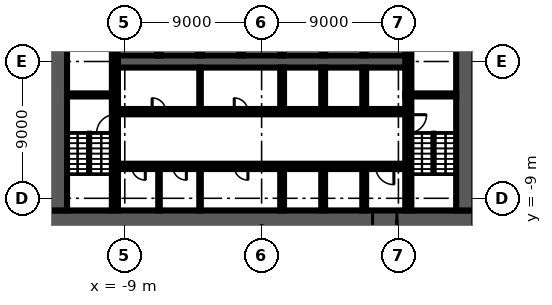
"""IFC4 building model, lengths in metres.
Left out: names, types, materials, properties, quantities, classifications, styles, units other than length and angle.
Written with IfcOpenShell. Run it as: python <this file> out.ifc"""

import sys

from ifc_helpers import new_model, si_unit, direction, frame, frame_2d, origin, place, context, subcontext, project, spatial, rectangle, extrude, element, fill, save


model = new_model("IFC4")
c1 = context("Model", 3, precision=1e-05, world=origin(), true_north=direction((0.0, 1.0)))
c2 = subcontext(c1, "Body", "Model", "MODEL_VIEW")
j1 = project(units=[si_unit("LENGTHUNIT", "METRE"), si_unit("PLANEANGLEUNIT", "RADIAN")], contexts=[c1])
p1 = place(None, origin())
s1 = spatial("IfcSite", under=j1, at=p1, CompositionType="ELEMENT")
p2 = place(p1, origin())
s2 = spatial("IfcBuilding", under=s1, at=p2, CompositionType="ELEMENT")
p3 = place(p2, frame((0.0, 0.0, -6.0)))
s3 = spatial("IfcBuildingStorey", under=s2, at=p3, CompositionType="ELEMENT", Elevation=-6.0)
p4 = place(p3, frame((14.0, -10.4, 0.0), z_axis=(0.0, 0.0, 1.0), x_axis=(-1.0, 0.0, 0.0)))
e1 = element("IfcWall", 1, at=p4, inside=s3, PredefinedType="SHEAR", context=c2, shape_type="SweptSolid", body=[
    extrude(rectangle(XDim=28.0, YDim=1.2, at=frame_2d((14.0, 0.0))), origin(), (0.0, 0.0, 1.0), 5.55),
])
p5 = place(p4, frame((5.1, 0.0, 0.0)))
e2 = element("IfcOpeningElement", 2, at=p5, cuts=e1, PredefinedType="OPENING", context=c2, shape_type="SweptSolid", body=[
    extrude(rectangle(XDim=1.6, YDim=2.1, at=frame_2d((0.8, 1.05))), frame((0.0, 0.61, 0.0), z_axis=(0.0, -1.0, 0.0), x_axis=(1.0, 0.0, 0.0)), (0.0, 0.0, 1.0), 1.22),
])
for number, where, z_axis, x_axis in (
    (3, (13.4, 9.8, 0.0), (0.0, 0.0, 1.0), (0.0, -1.0, 0.0)),
    (4, (-13.4, -9.8, 0.0), (0.0, 0.0, 1.0), (0.0, 1.0, 0.0)),
):
    element("IfcWall", number, at=place(p3, frame(where, z_axis=z_axis, x_axis=x_axis)), inside=s3, PredefinedType="SHEAR", context=c2, shape_type="SweptSolid", body=[
        extrude(rectangle(XDim=19.6, YDim=1.2, at=frame_2d((9.8, 0.0))), origin(), (0.0, 0.0, 1.0), 5.55),
    ])
p6 = place(p3, frame((9.65, -2.3, 0.0), z_axis=(0.0, 0.0, 1.0), x_axis=(0.0, -1.0, 0.0)))
e5 = element("IfcWall", 5, at=p6, inside=s3, PredefinedType="SHEAR", context=c2, shape_type="SweptSolid", body=[
    extrude(rectangle(XDim=7.5, YDim=0.4, at=frame_2d((3.75, 0.0))), origin(), (0.0, 0.0, 1.0), 5.55),
])
p7 = place(p6, frame((1.2, 0.0, 0.0)))
e6 = element("IfcOpeningElement", 6, at=p7, cuts=e5, PredefinedType="OPENING", context=c2, shape_type="SweptSolid", body=[
    extrude(rectangle(XDim=1.2, YDim=2.1, at=frame_2d((0.6, 1.05))), frame((0.0, 0.21, 0.0), z_axis=(0.0, -1.0, 0.0), x_axis=(1.0, 0.0, 0.0)), (0.0, 0.0, 1.0), 0.42),
])
p8 = place(p3, frame((9.65, 2.1, 0.0), z_axis=(0.0, 0.0, 1.0), x_axis=(0.0, -1.0, 0.0)))
e7 = element("IfcWall", 7, at=p8, inside=s3, PredefinedType="SHEAR", context=c2, shape_type="SweptSolid", body=[
    extrude(rectangle(XDim=4.2, YDim=0.4, at=frame_2d((2.1, 0.0))), origin(), (0.0, 0.0, 1.0), 5.55),
])
p9 = place(p8, frame((0.15, 0.0, 0.0)))
e8 = element("IfcOpeningElement", 8, at=p9, cuts=e7, PredefinedType="OPENING", context=c2, shape_type="SweptSolid", body=[
    extrude(rectangle(XDim=0.9, YDim=2.1, at=frame_2d((0.45, 1.05))), frame((0.0, 0.21, 0.0), z_axis=(0.0, -1.0, 0.0), x_axis=(1.0, 0.0, 0.0)), (0.0, 0.0, 1.0), 0.42),
])
p10 = place(p3, frame((-9.65, -9.8, 0.0), z_axis=(0.0, 0.0, 1.0), x_axis=(0.0, 1.0, 0.0)))
e9 = element("IfcWall", 9, at=p10, inside=s3, PredefinedType="SHEAR", context=c2, shape_type="SweptSolid", body=[
    extrude(rectangle(XDim=7.5, YDim=0.4, at=frame_2d((3.75, 0.0))), origin(), (0.0, 0.0, 1.0), 5.55),
])
p11 = place(p10, frame((5.1, 0.0, 0.0)))
e10 = element("IfcOpeningElement", 10, at=p11, cuts=e9, PredefinedType="OPENING", context=c2, shape_type="SweptSolid", body=[
    extrude(rectangle(XDim=1.2, YDim=2.1, at=frame_2d((0.6, 1.05))), frame((0.0, 0.21, 0.0), z_axis=(0.0, -1.0, 0.0), x_axis=(1.0, 0.0, 0.0)), (0.0, 0.0, 1.0), 0.42),
])
p12 = place(p3, frame((-9.65, -2.1, 0.0), z_axis=(0.0, 0.0, 1.0), x_axis=(0.0, 1.0, 0.0)))
e11 = element("IfcWall", 11, at=p12, inside=s3, PredefinedType="SHEAR", context=c2, shape_type="SweptSolid", body=[
    extrude(rectangle(XDim=4.2, YDim=0.4, at=frame_2d((2.1, 0.0))), origin(), (0.0, 0.0, 1.0), 5.55),
])
for number, where, z_axis, x_axis in (
    (12, (9.45, -2.2, 0.0), (0.0, 0.0, 1.0), (1.0, 0.0, 0.0)),
    (13, (-9.45, -2.2, 0.0), (0.0, 0.0, 1.0), (-1.0, 0.0, 0.0)),
):
    element("IfcWall", number, at=place(p3, frame(where, z_axis=z_axis, x_axis=x_axis)), inside=s3, PredefinedType="SHEAR", context=c2, shape_type="SweptSolid", body=[
        extrude(rectangle(XDim=3.35, YDim=0.2, at=frame_2d((1.675, 0.0))), origin(), (0.0, 0.0, 1.0), 5.55),
    ])
p13 = place(p3, frame((-9.45, -3.3, 0.0), z_axis=(0.0, 0.0, 1.0), x_axis=(1.0, 0.0, 0.0)))
e14 = element("IfcWall", 14, at=p13, inside=s3, PredefinedType="SHEAR", context=c2, shape_type="SweptSolid", body=[
    extrude(rectangle(XDim=18.9, YDim=0.35, at=frame_2d((9.45, 0.0))), origin(), (0.0, 0.0, 1.0), 5.55),
])
p14 = place(p13, frame((11.6, 0.0, 0.0)))
e15 = element("IfcOpeningElement", 15, at=p14, cuts=e14, PredefinedType="OPENING", context=c2, shape_type="SweptSolid", body=[
    extrude(rectangle(XDim=1.1, YDim=2.1, at=frame_2d((0.55, 1.05))), frame((0.0, 0.185, 0.0), z_axis=(0.0, -1.0, 0.0), x_axis=(1.0, 0.0, 0.0)), (0.0, 0.0, 1.0), 0.37),
])
p15 = place(p13, frame((14.3, 0.0, 0.0)))
e16 = element("IfcOpeningElement", 16, at=p15, cuts=e14, PredefinedType="OPENING", context=c2, shape_type="SweptSolid", body=[
    extrude(rectangle(XDim=1.1, YDim=2.1, at=frame_2d((0.55, 1.05))), frame((0.0, 0.185, 0.0), z_axis=(0.0, -1.0, 0.0), x_axis=(1.0, 0.0, 0.0)), (0.0, 0.0, 1.0), 0.37),
])
p16 = place(p13, frame((17.0, 0.0, 0.0)))
e17 = element("IfcOpeningElement", 17, at=p16, cuts=e14, PredefinedType="OPENING", context=c2, shape_type="SweptSolid", body=[
    extrude(rectangle(XDim=1.1, YDim=2.1, at=frame_2d((0.55, 1.05))), frame((0.0, 0.185, 0.0), z_axis=(0.0, -1.0, 0.0), x_axis=(1.0, 0.0, 0.0)), (0.0, 0.0, 1.0), 0.37),
])
p17 = place(p13, frame((2.25, 0.0, 0.0)))
e18 = element("IfcOpeningElement", 18, at=p17, cuts=e14, PredefinedType="OPENING", context=c2, shape_type="SweptSolid", body=[
    extrude(rectangle(XDim=0.9, YDim=2.1, at=frame_2d((0.45, 1.05))), frame((0.0, 0.185, 0.0), z_axis=(0.0, -1.0, 0.0), x_axis=(1.0, 0.0, 0.0)), (0.0, 0.0, 1.0), 0.37),
])
p18 = place(p13, frame((7.65, 0.0, 0.0)))
e19 = element("IfcOpeningElement", 19, at=p18, cuts=e14, PredefinedType="OPENING", context=c2, shape_type="SweptSolid", body=[
    extrude(rectangle(XDim=0.9, YDim=2.1, at=frame_2d((0.45, 1.05))), frame((0.0, 0.185, 0.0), z_axis=(0.0, -1.0, 0.0), x_axis=(1.0, 0.0, 0.0)), (0.0, 0.0, 1.0), 0.37),
])
p19 = place(p3, frame((9.45, -6.9, 0.0), z_axis=(0.0, 0.0, 1.0), x_axis=(-1.0, 0.0, 0.0)))
e20 = element("IfcWall", 20, at=p19, inside=s3, PredefinedType="SHEAR", context=c2, shape_type="SweptSolid", body=[
    extrude(rectangle(XDim=18.9, YDim=0.35, at=frame_2d((9.45, 0.0))), origin(), (0.0, 0.0, 1.0), 5.55),
])
p20 = place(p19, frame((6.2, 0.0, 0.0)))
e21 = element("IfcOpeningElement", 21, at=p20, cuts=e20, PredefinedType="OPENING", context=c2, shape_type="SweptSolid", body=[
    extrude(rectangle(XDim=1.1, YDim=2.1, at=frame_2d((0.55, 1.05))), frame((0.0, 0.185, 0.0), z_axis=(0.0, -1.0, 0.0), x_axis=(1.0, 0.0, 0.0)), (0.0, 0.0, 1.0), 0.37),
])
p21 = place(p19, frame((3.5, 0.0, 0.0)))
e22 = element("IfcOpeningElement", 22, at=p21, cuts=e20, PredefinedType="OPENING", context=c2, shape_type="SweptSolid", body=[
    extrude(rectangle(XDim=1.1, YDim=2.1, at=frame_2d((0.55, 1.05))), frame((0.0, 0.185, 0.0), z_axis=(0.0, -1.0, 0.0), x_axis=(1.0, 0.0, 0.0)), (0.0, 0.0, 1.0), 0.37),
])
p22 = place(p19, frame((0.75, 0.0, 0.0)))
e23 = element("IfcOpeningElement", 23, at=p22, cuts=e20, PredefinedType="OPENING", context=c2, shape_type="SweptSolid", body=[
    extrude(rectangle(XDim=1.2, YDim=2.1, at=frame_2d((0.6, 1.05))), frame((0.0, 0.185, 0.0), z_axis=(0.0, -1.0, 0.0), x_axis=(1.0, 0.0, 0.0)), (0.0, 0.0, 1.0), 0.37),
])
p23 = place(p19, frame((17.1, 0.0, 0.0)))
e24 = element("IfcOpeningElement", 24, at=p23, cuts=e20, PredefinedType="OPENING", context=c2, shape_type="SweptSolid", body=[
    extrude(rectangle(XDim=0.9, YDim=2.1, at=frame_2d((0.45, 1.05))), frame((0.0, 0.185, 0.0), z_axis=(0.0, -1.0, 0.0), x_axis=(1.0, 0.0, 0.0)), (0.0, 0.0, 1.0), 0.37),
])
p24 = place(p19, frame((14.4, 0.0, 0.0)))
e25 = element("IfcOpeningElement", 25, at=p24, cuts=e20, PredefinedType="OPENING", context=c2, shape_type="SweptSolid", body=[
    extrude(rectangle(XDim=0.9, YDim=2.1, at=frame_2d((0.45, 1.05))), frame((0.0, 0.185, 0.0), z_axis=(0.0, -1.0, 0.0), x_axis=(1.0, 0.0, 0.0)), (0.0, 0.0, 1.0), 0.37),
])
p25 = place(p19, frame((10.35, 0.0, 0.0)))
e26 = element("IfcOpeningElement", 26, at=p25, cuts=e20, PredefinedType="OPENING", context=c2, shape_type="SweptSolid", body=[
    extrude(rectangle(XDim=0.9, YDim=2.1, at=frame_2d((0.45, 1.05))), frame((0.0, 0.185, 0.0), z_axis=(0.0, -1.0, 0.0), x_axis=(1.0, 0.0, 0.0)), (0.0, 0.0, 1.0), 0.37),
])
p26 = place(p3, frame((-9.45, 0.0, 0.0), z_axis=(0.0, 0.0, 1.0), x_axis=(1.0, 0.0, 0.0)))
e27 = element("IfcWall", 27, at=p26, inside=s3, PredefinedType="SHEAR", context=c2, shape_type="SweptSolid", body=[
    extrude(rectangle(XDim=18.9, YDim=0.8, at=frame_2d((9.45, 0.0))), origin(), (0.0, 0.0, 1.0), 5.55),
])
for number, where, z_axis, x_axis in (
    (28, (6.75, -9.8, 0.0), (0.0, 0.0, 1.0), (0.0, 1.0, 0.0)),
    (29, (6.75, -3.125, 0.0), (0.0, 0.0, 1.0), (0.0, 1.0, 0.0)),
    (30, (6.75, 0.4, 0.0), (0.0, 0.0, 1.0), (0.0, 1.0, 0.0)),
    (31, (4.05, -9.8, 0.0), (0.0, 0.0, 1.0), (0.0, 1.0, 0.0)),
    (32, (4.05, -3.125, 0.0), (0.0, 0.0, 1.0), (0.0, 1.0, 0.0)),
    (33, (4.05, 0.4, 0.0), (0.0, 0.0, 1.0), (0.0, 1.0, 0.0)),
    (34, (1.35, -9.8, 0.0), (0.0, 0.0, 1.0), (0.0, 1.0, 0.0)),
    (35, (1.35, -3.125, 0.0), (0.0, 0.0, 1.0), (0.0, 1.0, 0.0)),
    (36, (1.35, 0.4, 0.0), (0.0, 0.0, 1.0), (0.0, 1.0, 0.0)),
    (37, (-1.35, 0.4, 0.0), (0.0, 0.0, 1.0), (0.0, 1.0, 0.0)),
):
    element("IfcWall", number, at=place(p3, frame(where, z_axis=z_axis, x_axis=x_axis)), inside=s3, PredefinedType="SOLIDWALL", context=c2, shape_type="SweptSolid", body=[
        extrude(rectangle(XDim=2.725, YDim=0.25, at=frame_2d((1.363, 0.0))), origin(), (0.0, 0.0, 1.0), 5.55),
    ])
for number, where, z_axis, x_axis in (
    (38, (-4.05, -9.8, 0.0), (0.0, 0.0, 1.0), (0.0, 1.0, 0.0)),
    (39, (-4.05, -3.125, 0.0), (0.0, 0.0, 1.0), (0.0, 1.0, 0.0)),
):
    element("IfcWall", number, at=place(p3, frame(where, z_axis=z_axis, x_axis=x_axis)), inside=s3, PredefinedType="PARTITIONING", context=c2, shape_type="SweptSolid", body=[
        extrude(rectangle(XDim=2.725, YDim=0.1, at=frame_2d((1.363, 0.0))), origin(), (0.0, 0.0, 1.0), 5.55),
    ])
p27 = place(p3, frame((-4.05, 0.4, 0.0), z_axis=(0.0, 0.0, 1.0), x_axis=(0.0, 1.0, 0.0)))
e40 = element("IfcWall", 40, at=p27, inside=s3, PredefinedType="SOLIDWALL", context=c2, shape_type="SweptSolid", body=[
    extrude(rectangle(XDim=2.725, YDim=0.25, at=frame_2d((1.363, 0.0))), origin(), (0.0, 0.0, 1.0), 5.55),
])
p28 = place(p3, frame((-6.75, -9.8, 0.0), z_axis=(0.0, 0.0, 1.0), x_axis=(0.0, 1.0, 0.0)))
e41 = element("IfcWall", 41, at=p28, inside=s3, PredefinedType="PARTITIONING", context=c2, shape_type="SweptSolid", body=[
    extrude(rectangle(XDim=2.725, YDim=0.1, at=frame_2d((1.363, 0.0))), origin(), (0.0, 0.0, 1.0), 5.55),
])
p29 = place(p3, frame((-6.75, 0.4, 0.0), z_axis=(0.0, 0.0, 1.0), x_axis=(0.0, 1.0, 0.0)))
e42 = element("IfcWall", 42, at=p29, inside=s3, PredefinedType="SOLIDWALL", context=c2, shape_type="SweptSolid", body=[
    extrude(rectangle(XDim=2.725, YDim=0.25, at=frame_2d((1.363, 0.0))), origin(), (0.0, 0.0, 1.0), 5.55),
])
p30 = place(p14, origin())
e43 = element("IfcDoor", 43, at=p30, inside=s3, OperationType="DOUBLE_DOOR_SLIDING", PredefinedType="DOOR", context=c2, shape_type="SweptSolid", body=[
    extrude(rectangle(XDim=1.1, YDim=2.1, at=frame_2d((0.55, 1.05))), frame((0.0, 0.025, 0.0), z_axis=(0.0, -1.0, 0.0), x_axis=(1.0, 0.0, 0.0)), (0.0, 0.0, 1.0), 0.05),
])
fill(e15, e43)
p31 = place(p15, origin())
e44 = element("IfcDoor", 44, at=p31, inside=s3, OperationType="DOUBLE_DOOR_SLIDING", PredefinedType="DOOR", context=c2, shape_type="SweptSolid", body=[
    extrude(rectangle(XDim=1.1, YDim=2.1, at=frame_2d((0.55, 1.05))), frame((0.0, 0.025, 0.0), z_axis=(0.0, -1.0, 0.0), x_axis=(1.0, 0.0, 0.0)), (0.0, 0.0, 1.0), 0.05),
])
fill(e16, e44)
p32 = place(p16, origin())
e45 = element("IfcDoor", 45, at=p32, inside=s3, OperationType="DOUBLE_DOOR_SLIDING", PredefinedType="DOOR", context=c2, shape_type="SweptSolid", body=[
    extrude(rectangle(XDim=1.1, YDim=2.1, at=frame_2d((0.55, 1.05))), frame((0.0, 0.025, 0.0), z_axis=(0.0, -1.0, 0.0), x_axis=(1.0, 0.0, 0.0)), (0.0, 0.0, 1.0), 0.05),
])
fill(e17, e45)
p33 = place(p20, origin())
e46 = element("IfcDoor", 46, at=p33, inside=s3, OperationType="DOUBLE_DOOR_SLIDING", PredefinedType="DOOR", context=c2, shape_type="SweptSolid", body=[
    extrude(rectangle(XDim=1.1, YDim=2.1, at=frame_2d((0.55, 1.05))), frame((0.0, 0.025, 0.0), z_axis=(0.0, -1.0, 0.0), x_axis=(1.0, 0.0, 0.0)), (0.0, 0.0, 1.0), 0.05),
])
fill(e21, e46)
p34 = place(p21, origin())
e47 = element("IfcDoor", 47, at=p34, inside=s3, OperationType="DOUBLE_DOOR_SLIDING", PredefinedType="DOOR", context=c2, shape_type="SweptSolid", body=[
    extrude(rectangle(XDim=1.1, YDim=2.1, at=frame_2d((0.55, 1.05))), frame((0.0, 0.025, 0.0), z_axis=(0.0, -1.0, 0.0), x_axis=(1.0, 0.0, 0.0)), (0.0, 0.0, 1.0), 0.05),
])
fill(e22, e47)
p35 = place(p5, origin())
e48 = element("IfcDoor", 48, at=p35, inside=s3, OperationType="DOUBLE_DOOR_SINGLE_SWING", PredefinedType="DOOR", context=c2, shape_type="SweptSolid", body=[
    extrude(rectangle(XDim=1.6, YDim=2.1, at=frame_2d((0.8, 1.05))), frame((0.0, 0.025, 0.0), z_axis=(0.0, -1.0, 0.0), x_axis=(1.0, 0.0, 0.0)), (0.0, 0.0, 1.0), 0.05),
])
fill(e2, e48)
p36 = place(p22, origin())
e49 = element("IfcDoor", 49, at=p36, inside=s3, OperationType="SINGLE_SWING_LEFT", PredefinedType="DOOR", context=c2, shape_type="SweptSolid", body=[
    extrude(rectangle(XDim=1.2, YDim=2.1, at=frame_2d((0.6, 1.05))), frame((0.0, 0.025, 0.0), z_axis=(0.0, -1.0, 0.0), x_axis=(1.0, 0.0, 0.0)), (0.0, 0.0, 1.0), 0.05),
])
fill(e23, e49)
p37 = place(p17, origin())
e50 = element("IfcDoor", 50, at=p37, inside=s3, OperationType="SINGLE_SWING_RIGHT", PredefinedType="DOOR", context=c2, shape_type="SweptSolid", body=[
    extrude(rectangle(XDim=0.9, YDim=2.1, at=frame_2d((0.45, 1.05))), frame((0.0, 0.025, 0.0), z_axis=(0.0, -1.0, 0.0), x_axis=(1.0, 0.0, 0.0)), (0.0, 0.0, 1.0), 0.05),
])
fill(e18, e50)
p38 = place(p18, origin())
e51 = element("IfcDoor", 51, at=p38, inside=s3, OperationType="SINGLE_SWING_LEFT", PredefinedType="DOOR", context=c2, shape_type="SweptSolid", body=[
    extrude(rectangle(XDim=0.9, YDim=2.1, at=frame_2d((0.45, 1.05))), frame((0.0, 0.025, 0.0), z_axis=(0.0, -1.0, 0.0), x_axis=(1.0, 0.0, 0.0)), (0.0, 0.0, 1.0), 0.05),
])
fill(e19, e51)
p39 = place(p23, origin())
e52 = element("IfcDoor", 52, at=p39, inside=s3, OperationType="SINGLE_SWING_RIGHT", PredefinedType="DOOR", context=c2, shape_type="SweptSolid", body=[
    extrude(rectangle(XDim=0.9, YDim=2.1, at=frame_2d((0.45, 1.05))), frame((0.0, 0.025, 0.0), z_axis=(0.0, -1.0, 0.0), x_axis=(1.0, 0.0, 0.0)), (0.0, 0.0, 1.0), 0.05),
])
fill(e24, e52)
p40 = place(p24, origin())
e53 = element("IfcDoor", 53, at=p40, inside=s3, OperationType="SINGLE_SWING_LEFT", PredefinedType="DOOR", context=c2, shape_type="SweptSolid", body=[
    extrude(rectangle(XDim=0.9, YDim=2.1, at=frame_2d((0.45, 1.05))), frame((0.0, 0.025, 0.0), z_axis=(0.0, -1.0, 0.0), x_axis=(1.0, 0.0, 0.0)), (0.0, 0.0, 1.0), 0.05),
])
fill(e25, e53)
p41 = place(p25, origin())
e54 = element("IfcDoor", 54, at=p41, inside=s3, OperationType="SINGLE_SWING_RIGHT", PredefinedType="DOOR", context=c2, shape_type="SweptSolid", body=[
    extrude(rectangle(XDim=0.9, YDim=2.1, at=frame_2d((0.45, 1.05))), frame((0.0, 0.025, 0.0), z_axis=(0.0, -1.0, 0.0), x_axis=(1.0, 0.0, 0.0)), (0.0, 0.0, 1.0), 0.05),
])
fill(e26, e54)
p42 = place(p7, origin())
e55 = element("IfcDoor", 55, at=p42, inside=s3, OperationType="SINGLE_SWING_RIGHT", PredefinedType="DOOR", context=c2, shape_type="SweptSolid", body=[
    extrude(rectangle(XDim=1.2, YDim=2.1, at=frame_2d((0.6, 1.05))), frame((0.0, 0.025, 0.0), z_axis=(0.0, -1.0, 0.0), x_axis=(1.0, 0.0, 0.0)), (0.0, 0.0, 1.0), 0.05),
])
fill(e6, e55)
p43 = place(p11, origin())
e56 = element("IfcDoor", 56, at=p43, inside=s3, OperationType="SINGLE_SWING_LEFT", PredefinedType="DOOR", context=c2, shape_type="SweptSolid", body=[
    extrude(rectangle(XDim=1.2, YDim=2.1, at=frame_2d((0.6, 1.05))), frame((0.0, 0.025, 0.0), z_axis=(0.0, -1.0, 0.0), x_axis=(1.0, 0.0, 0.0)), (0.0, 0.0, 1.0), 0.05),
])
fill(e10, e56)
save(model, sys.argv[1])
